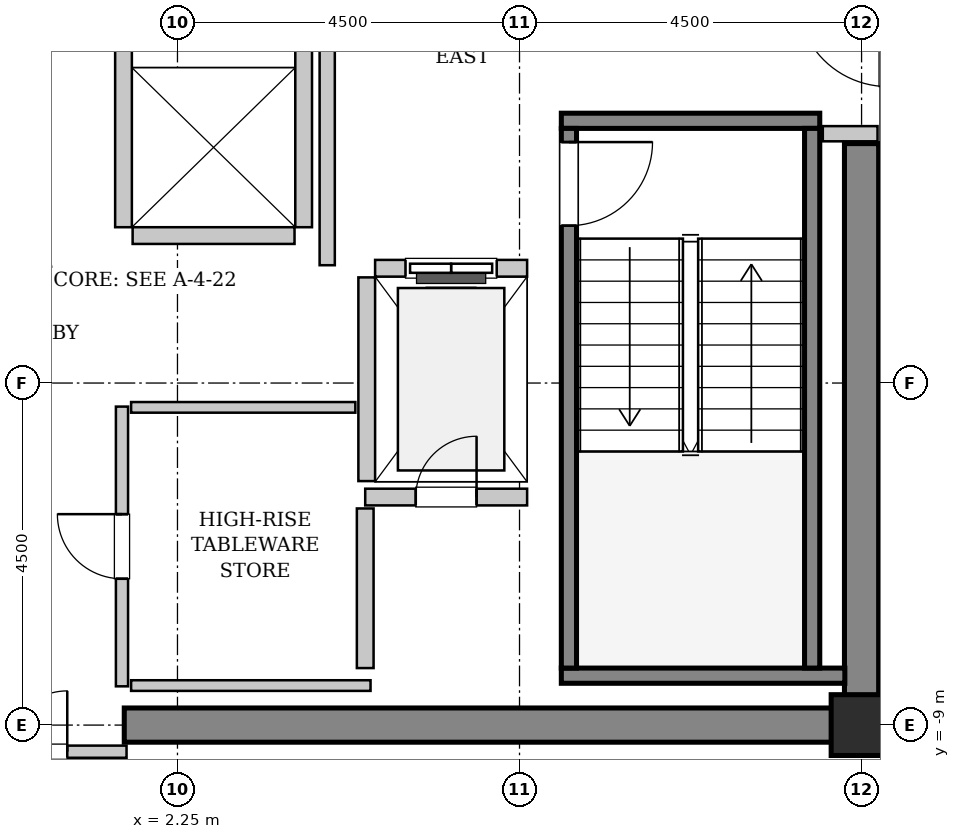
"""IFC4 building model, lengths in metres.
Left out: names, types, materials, properties, quantities, classifications, styles, units other than length and angle.
Written with IfcOpenShell. Run it as: python <this file> out.ifc"""

import sys

from ifc_helpers import new_model, si_unit, direction, frame, frame_2d, origin, origin_2d, place, context, subcontext, project, spatial, rectangle, hollow_rectangle, extrude, source, transform, mapped, element, fill, save


model = new_model("IFC4")
c1 = context("Model", 3, precision=1e-05, world=origin(), true_north=direction((0.0, 1.0)))
c2 = subcontext(c1, "Body", "Model", "MODEL_VIEW")
j1 = project(units=[si_unit("LENGTHUNIT", "METRE"), si_unit("PLANEANGLEUNIT", "RADIAN")], contexts=[c1])
p1 = place(None, origin())
s1 = spatial("IfcSite", under=j1, at=p1, CompositionType="ELEMENT")
p2 = place(p1, origin())
s2 = spatial("IfcBuilding", under=s1, at=p2, CompositionType="ELEMENT")
p3 = place(p2, frame((0.0, 0.0, 279.8)))
s3 = spatial("IfcBuildingStorey", under=s2, at=p3, CompositionType="ELEMENT", Elevation=279.8)
m1 = source(origin(), c2, "Body", "SweptSolid", [
    extrude(rectangle(XDim=9.925, YDim=0.45, at=frame_2d((4.962, 0.0))), origin(), (0.0, 0.0, 1.0), 3.8),
])
p4 = place(p3, frame((1.55, -9.0, 0.0), z_axis=(0.0, 0.0, 1.0), x_axis=(1.0, 0.0, 0.0)))
e1 = element("IfcWall", 1, at=p4, inside=s3, PredefinedType="SHEAR", context=c2, shape_type="MappedRepresentation", body=[
    mapped(m1, transform((0.0, 0.0, 0.0), x_axis=(1.0, 0.0, 0.0), y_axis=(0.0, 1.0, 0.0), z_axis=(0.0, 0.0, 1.0), scale=1.0)),
])
m2 = source(origin(), c2, "Body", "SweptSolid", [
    extrude(rectangle(XDim=7.425, YDim=0.45, at=frame_2d((3.712, 0.0))), origin(), (0.0, 0.0, 1.0), 3.8),
])
p5 = place(p3, frame((11.25, -8.775, 0.0), z_axis=(0.0, 0.0, 1.0), x_axis=(0.0, 1.0, 0.0)))
e2 = element("IfcWall", 2, at=p5, inside=s3, PredefinedType="SHEAR", context=c2, shape_type="MappedRepresentation", body=[
    mapped(m2, transform((0.0, 0.0, 0.0), x_axis=(1.0, 0.0, 0.0), y_axis=(0.0, 1.0, 0.0), z_axis=(0.0, 0.0, 1.0), scale=1.0)),
])
m3 = source(origin(), c2, "Body", "SweptSolid", [
    extrude(hollow_rectangle(XDim=0.8, YDim=0.8, WallThickness=0.04, InnerFilletRadius=0.04, OuterFilletRadius=0.08, at=origin_2d()), origin(), (0.0, 0.0, 1.0), 3.8),
])
p6 = place(p3, frame((11.25, -9.0, 0.0), z_axis=(0.0, 0.0, 1.0), x_axis=(1.0, 0.0, 0.0)))
e3 = element("IfcColumn", 3, at=p6, inside=s3, PredefinedType="COLUMN", context=c2, shape_type="MappedRepresentation", body=[
    mapped(m3, transform((0.0, 0.0, 0.0), x_axis=(1.0, 0.0, 0.0), y_axis=(0.0, 1.0, 0.0), z_axis=(0.0, 0.0, 1.0), scale=1.0)),
])
m4 = source(origin(), c2, "Body", "SweptSolid", [
    extrude(rectangle(XDim=3.4, YDim=0.2, at=frame_2d((1.7, 0.0))), origin(), (0.0, 0.0, 1.0), 3.8),
])
p7 = place(p3, frame((7.3, -1.05, 0.0), z_axis=(0.0, 0.0, 1.0), x_axis=(1.0, 0.0, 0.0)))
e4 = element("IfcWall", 4, at=p7, inside=s3, PredefinedType="SOLIDWALL", context=c2, shape_type="MappedRepresentation", body=[
    mapped(m4, transform((0.0, 0.0, 0.0), x_axis=(1.0, 0.0, 0.0), y_axis=(0.0, 1.0, 0.0), z_axis=(0.0, 0.0, 1.0), scale=1.0)),
])
m5 = source(origin(), c2, "Body", "SweptSolid", [
    extrude(rectangle(XDim=3.73, YDim=0.2, at=frame_2d((1.865, 0.0))), origin(), (0.0, 0.0, 1.0), 3.8),
])
p8 = place(p3, frame((7.3, -8.35, 0.0), z_axis=(0.0, 0.0, 1.0), x_axis=(1.0, 0.0, 0.0)))
e5 = element("IfcWall", 5, at=p8, inside=s3, PredefinedType="SOLIDWALL", context=c2, shape_type="MappedRepresentation", body=[
    mapped(m5, transform((0.0, 0.0, 0.0), x_axis=(1.0, 0.0, 0.0), y_axis=(0.0, 1.0, 0.0), z_axis=(0.0, 0.0, 1.0), scale=1.0)),
])
m6 = source(origin(), c2, "Body", "SweptSolid", [
    extrude(rectangle(XDim=7.1, YDim=0.2, at=frame_2d((3.55, 0.0))), origin(), (0.0, 0.0, 1.0), 3.8),
])
p9 = place(p3, frame((7.4, -1.15, 0.0), z_axis=(0.0, 0.0, 1.0), x_axis=(0.0, -1.0, 0.0)))
e6 = element("IfcWall", 6, at=p9, inside=s3, PredefinedType="SOLIDWALL", context=c2, shape_type="MappedRepresentation", body=[
    mapped(m6, transform((0.0, 0.0, 0.0), x_axis=(1.0, 0.0, 0.0), y_axis=(0.0, 1.0, 0.0), z_axis=(0.0, 0.0, 1.0), scale=1.0)),
])
p10 = place(p9, frame((0.18, 0.0, 0.0)))
e7 = element("IfcOpeningElement", 7, at=p10, cuts=e6, PredefinedType="OPENING", context=c2, shape_type="SweptSolid", body=[
    extrude(rectangle(XDim=1.1, YDim=2.15, at=frame_2d((0.55, 1.075))), frame((0.0, 0.11, 0.0), z_axis=(0.0, -1.0, 0.0), x_axis=(1.0, 0.0, 0.0)), (0.0, 0.0, 1.0), 0.22),
])
p11 = place(p3, frame((10.6, -1.15, 0.0), z_axis=(0.0, 0.0, 1.0), x_axis=(0.0, -1.0, 0.0)))
e8 = element("IfcWall", 8, at=p11, inside=s3, PredefinedType="SOLIDWALL", context=c2, shape_type="MappedRepresentation", body=[
    mapped(m6, transform((0.0, 0.0, 0.0), x_axis=(1.0, 0.0, 0.0), y_axis=(0.0, 1.0, 0.0), z_axis=(0.0, 0.0, 1.0), scale=1.0)),
])
m7 = source(origin(), c2, "Body", "SweptSolid", [
    extrude(rectangle(XDim=2.0, YDim=0.22, at=frame_2d((1.0, 0.0))), origin(), (0.0, 0.0, 1.0), 3.535),
])
p12 = place(p3, frame((6.85, -2.99, 0.0), z_axis=(0.0, 0.0, 1.0), x_axis=(-1.0, 0.0, 0.0)))
e9 = element("IfcWall", 9, at=p12, inside=s3, PredefinedType="SOLIDWALL", context=c2, shape_type="MappedRepresentation", body=[
    mapped(m7, transform((0.0, 0.0, 0.0), x_axis=(1.0, 0.0, 0.0), y_axis=(0.0, 1.0, 0.0), z_axis=(0.0, 0.0, 1.0), scale=1.0)),
])
p13 = place(p12, frame((0.4, 0.0, 0.0)))
e10 = element("IfcOpeningElement", 10, at=p13, cuts=e9, PredefinedType="OPENING", context=c2, shape_type="SweptSolid", body=[
    extrude(rectangle(XDim=1.2, YDim=2.2, at=frame_2d((0.6, 1.1))), frame((0.0, 0.12, 0.0), z_axis=(0.0, -1.0, 0.0), x_axis=(1.0, 0.0, 0.0)), (0.0, 0.0, 1.0), 0.24),
])
m8 = source(origin(), c2, "Body", "SweptSolid", [
    extrude(rectangle(XDim=2.68, YDim=0.22, at=frame_2d((1.34, 0.0))), origin(), (0.0, 0.0, 1.0), 3.535),
])
p14 = place(p3, frame((4.74, -3.11, 0.0), z_axis=(0.0, 0.0, 1.0), x_axis=(0.0, -1.0, 0.0)))
e11 = element("IfcWall", 11, at=p14, inside=s3, PredefinedType="SOLIDWALL", context=c2, shape_type="MappedRepresentation", body=[
    mapped(m8, transform((0.0, 0.0, 0.0), x_axis=(1.0, 0.0, 0.0), y_axis=(0.0, 1.0, 0.0), z_axis=(0.0, 0.0, 1.0), scale=1.0)),
])
m9 = source(origin(), c2, "Body", "SweptSolid", [
    extrude(rectangle(XDim=4.9, YDim=0.22, at=frame_2d((2.45, 0.0))), origin(), (0.0, 0.0, 1.0), 3.535),
])
for number, where, z_axis, x_axis in (
    (12, (1.54, 2.45, 0.0), (0.0, 0.0, 1.0), (0.0, -1.0, 0.0)),
    (13, (3.91, -2.45, 0.0), (0.0, 0.0, 1.0), (0.0, 1.0, 0.0)),
):
    element("IfcWall", number, at=place(p3, frame(where, z_axis=z_axis, x_axis=x_axis)), inside=s3, PredefinedType="SOLIDWALL", context=c2, shape_type="MappedRepresentation", body=[
        mapped(m9, transform((0.0, 0.0, 0.0), x_axis=(1.0, 0.0, 0.0), y_axis=(0.0, 1.0, 0.0), z_axis=(0.0, 0.0, 1.0), scale=1.0)),
    ])
m10 = source(origin(), c2, "Body", "SweptSolid", [
    extrude(rectangle(XDim=2.13, YDim=0.22, at=frame_2d((1.065, 0.0))), origin(), (0.0, 0.0, 1.0), 3.535),
])
p15 = place(p3, frame((1.66, -2.56, 0.0), z_axis=(0.0, 0.0, 1.0), x_axis=(1.0, 0.0, 0.0)))
e14 = element("IfcWall", 14, at=p15, inside=s3, PredefinedType="SOLIDWALL", context=c2, shape_type="MappedRepresentation", body=[
    mapped(m10, transform((0.0, 0.0, 0.0), x_axis=(1.0, 0.0, 0.0), y_axis=(0.0, 1.0, 0.0), z_axis=(0.0, 0.0, 1.0), scale=1.0)),
])
p16 = place(p3, frame((4.72, -6.0, 0.0), z_axis=(0.0, 0.0, 1.0), x_axis=(1.0, 0.0, 0.0)))
e15 = element("IfcWall", 15, at=p16, inside=s3, PredefinedType="SOLIDWALL", context=c2, shape_type="MappedRepresentation", body=[
    mapped(m10, transform((0.0, 0.0, 0.0), x_axis=(1.0, 0.0, 0.0), y_axis=(0.0, 1.0, 0.0), z_axis=(0.0, 0.0, 1.0), scale=1.0)),
])
p17 = place(p16, frame((0.665, 0.0, 0.0)))
e16 = element("IfcOpeningElement", 16, at=p17, cuts=e15, PredefinedType="OPENING", context=c2, shape_type="SweptSolid", body=[
    extrude(rectangle(XDim=0.8, YDim=2.0, at=frame_2d((0.4, 1.0))), frame((0.0, 0.12, 0.0), z_axis=(0.0, -1.0, 0.0), x_axis=(1.0, 0.0, 0.0)), (0.0, 0.0, 1.0), 0.24),
])
m11 = source(origin(), c2, "Body", "SweptSolid", [
    extrude(rectangle(XDim=2.1, YDim=0.22, at=frame_2d((1.05, 0.0))), origin(), (0.0, 0.0, 1.0), 3.535),
])
p18 = place(p3, frame((4.72, -8.25, 0.0), z_axis=(0.0, 0.0, 1.0), x_axis=(0.0, 1.0, 0.0)))
e17 = element("IfcWall", 17, at=p18, inside=s3, PredefinedType="SOLIDWALL", context=c2, shape_type="MappedRepresentation", body=[
    mapped(m11, transform((0.0, 0.0, 0.0), x_axis=(1.0, 0.0, 0.0), y_axis=(0.0, 1.0, 0.0), z_axis=(0.0, 0.0, 1.0), scale=1.0)),
])
m12 = source(origin(), c2, "Body", "SweptSolid", [
    extrude(rectangle(XDim=5.9, YDim=0.2, at=frame_2d((2.95, 0.0))), origin(), (0.0, 0.0, 1.0), 3.535),
])
p19 = place(p3, frame((4.22, -2.95, 0.0), z_axis=(0.0, 0.0, 1.0), x_axis=(0.0, 1.0, 0.0)))
e18 = element("IfcWall", 18, at=p19, inside=s3, PredefinedType="PARTITIONING", context=c2, shape_type="MappedRepresentation", body=[
    mapped(m12, transform((0.0, 0.0, 0.0), x_axis=(1.0, 0.0, 0.0), y_axis=(0.0, 1.0, 0.0), z_axis=(0.0, 0.0, 1.0), scale=1.0)),
])
m13 = source(origin(), c2, "Body", "SweptSolid", [
    extrude(rectangle(XDim=0.72, YDim=0.2, at=frame_2d((0.36, 0.0))), origin(), (0.0, 0.0, 1.0), 3.535),
])
p20 = place(p3, frame((10.74, -1.22, 0.0), z_axis=(0.0, 0.0, 1.0), x_axis=(1.0, 0.0, 0.0)))
e19 = element("IfcWall", 19, at=p20, inside=s3, PredefinedType="PARTITIONING", context=c2, shape_type="MappedRepresentation", body=[
    mapped(m13, transform((0.0, 0.0, 0.0), x_axis=(1.0, 0.0, 0.0), y_axis=(0.0, 1.0, 0.0), z_axis=(0.0, 0.0, 1.0), scale=1.0)),
])
m14 = source(origin(), c2, "Body", "SweptSolid", [
    extrude(rectangle(XDim=3.16, YDim=0.16, at=frame_2d((1.58, 0.0))), origin(), (0.0, 0.0, 1.0), 2.625),
])
p21 = place(p3, frame((-1.58, -9.35, 0.0), z_axis=(0.0, 0.0, 1.0), x_axis=(1.0, 0.0, 0.0)))
e20 = element("IfcWall", 20, at=p21, inside=s3, PredefinedType="PARTITIONING", context=c2, shape_type="MappedRepresentation", body=[
    mapped(m14, transform((0.0, 0.0, 0.0), x_axis=(1.0, 0.0, 0.0), y_axis=(0.0, 1.0, 0.0), z_axis=(0.0, 0.0, 1.0), scale=1.0)),
])
p22 = place(p21, frame((0.78, 0.0, 0.0)))
e21 = element("IfcOpeningElement", 21, at=p22, cuts=e20, PredefinedType="OPENING", context=c2, shape_type="SweptSolid", body=[
    extrude(rectangle(XDim=1.6, YDim=2.3, at=frame_2d((0.8, 1.15))), frame((0.0, 0.09, 0.0), z_axis=(0.0, -1.0, 0.0), x_axis=(1.0, 0.0, 0.0)), (0.0, 0.0, 1.0), 0.18),
])
m15 = source(origin(), c2, "Body", "SweptSolid", [
    extrude(rectangle(XDim=3.68, YDim=0.16, at=frame_2d((1.84, 0.0))), origin(), (0.0, 0.0, 1.0), 3.535),
])
p23 = place(p3, frame((1.52, -8.49, 0.0), z_axis=(0.0, 0.0, 1.0), x_axis=(0.0, 1.0, 0.0)))
e22 = element("IfcWall", 22, at=p23, inside=s3, PredefinedType="PARTITIONING", context=c2, shape_type="MappedRepresentation", body=[
    mapped(m15, transform((0.0, 0.0, 0.0), x_axis=(1.0, 0.0, 0.0), y_axis=(0.0, 1.0, 0.0), z_axis=(0.0, 0.0, 1.0), scale=1.0)),
])
p24 = place(p23, frame((1.415, 0.0, 0.0)))
e23 = element("IfcOpeningElement", 23, at=p24, cuts=e22, PredefinedType="OPENING", context=c2, shape_type="SweptSolid", body=[
    extrude(rectangle(XDim=0.85, YDim=2.1, at=frame_2d((0.425, 1.05))), frame((0.0, 0.09, 0.0), z_axis=(0.0, -1.0, 0.0), x_axis=(1.0, 0.0, 0.0)), (0.0, 0.0, 1.0), 0.18),
])
m16 = source(origin(), c2, "Body", "SweptSolid", [
    extrude(rectangle(XDim=2.95, YDim=0.14, at=frame_2d((1.475, 0.0))), origin(), (0.0, 0.0, 1.0), 3.535),
])
p25 = place(p3, frame((1.64, -4.82, 0.0), z_axis=(0.0, 0.0, 1.0), x_axis=(1.0, 0.0, 0.0)))
e24 = element("IfcWall", 24, at=p25, inside=s3, PredefinedType="PARTITIONING", context=c2, shape_type="MappedRepresentation", body=[
    mapped(m16, transform((0.0, 0.0, 0.0), x_axis=(1.0, 0.0, 0.0), y_axis=(0.0, 1.0, 0.0), z_axis=(0.0, 0.0, 1.0), scale=1.0)),
])
m17 = source(origin(), c2, "Body", "SweptSolid", [
    extrude(rectangle(XDim=3.15, YDim=0.14, at=frame_2d((1.575, 0.0))), origin(), (0.0, 0.0, 1.0), 3.535),
])
p26 = place(p3, frame((1.64, -8.48, 0.0), z_axis=(0.0, 0.0, 1.0), x_axis=(1.0, 0.0, 0.0)))
e25 = element("IfcWall", 25, at=p26, inside=s3, PredefinedType="PARTITIONING", context=c2, shape_type="MappedRepresentation", body=[
    mapped(m17, transform((0.0, 0.0, 0.0), x_axis=(1.0, 0.0, 0.0), y_axis=(0.0, 1.0, 0.0), z_axis=(0.0, 0.0, 1.0), scale=1.0)),
])
m18 = source(origin(), c2, "Body", "SweptSolid", [
    extrude(rectangle(XDim=1.1, YDim=2.15, at=frame_2d((0.55, 1.075))), frame((0.0, 0.025, 0.0), z_axis=(0.0, -1.0, 0.0), x_axis=(1.0, 0.0, 0.0)), (0.0, 0.0, 1.0), 0.05),
])
p27 = place(p10, origin())
e26 = element("IfcDoor", 26, at=p27, inside=s3, OperationType="SINGLE_SWING_LEFT", PredefinedType="DOOR", context=c2, shape_type="MappedRepresentation", body=[
    mapped(m18, transform((0.0, 0.0, 0.0), x_axis=(1.0, 0.0, 0.0), y_axis=(0.0, 1.0, 0.0), z_axis=(0.0, 0.0, 1.0), scale=1.0)),
])
fill(e7, e26)
m19 = source(origin(), c2, "Body", "SweptSolid", [
    extrude(rectangle(XDim=1.2, YDim=2.2, at=frame_2d((0.6, 1.1))), frame((0.0, 0.025, 0.0), z_axis=(0.0, -1.0, 0.0), x_axis=(1.0, 0.0, 0.0)), (0.0, 0.0, 1.0), 0.05),
])
p28 = place(p13, origin())
e27 = element("IfcDoor", 27, at=p28, inside=s3, OperationType="SLIDING_TO_LEFT", PredefinedType="DOOR", context=c2, shape_type="MappedRepresentation", body=[
    mapped(m19, transform((0.0, 0.0, 0.0), x_axis=(1.0, 0.0, 0.0), y_axis=(0.0, 1.0, 0.0), z_axis=(0.0, 0.0, 1.0), scale=1.0)),
])
fill(e10, e27)
m20 = source(origin(), c2, "Body", "SweptSolid", [
    extrude(rectangle(XDim=0.8, YDim=2.0, at=frame_2d((0.4, 1.0))), frame((0.0, 0.025, 0.0), z_axis=(0.0, -1.0, 0.0), x_axis=(1.0, 0.0, 0.0)), (0.0, 0.0, 1.0), 0.05),
])
p29 = place(p17, origin())
e28 = element("IfcDoor", 28, at=p29, inside=s3, OperationType="SINGLE_SWING_RIGHT", PredefinedType="TRAPDOOR", context=c2, shape_type="MappedRepresentation", body=[
    mapped(m20, transform((0.0, 0.0, 0.0), x_axis=(1.0, 0.0, 0.0), y_axis=(0.0, 1.0, 0.0), z_axis=(0.0, 0.0, 1.0), scale=1.0)),
])
fill(e16, e28)
m21 = source(origin(), c2, "Body", "SweptSolid", [
    extrude(rectangle(XDim=1.6, YDim=2.3, at=frame_2d((0.8, 1.15))), frame((0.0, 0.025, 0.0), z_axis=(0.0, -1.0, 0.0), x_axis=(1.0, 0.0, 0.0)), (0.0, 0.0, 1.0), 0.05),
])
p30 = place(p22, origin())
e29 = element("IfcDoor", 29, at=p30, inside=s3, OperationType="DOUBLE_DOOR_SINGLE_SWING", PredefinedType="DOOR", context=c2, shape_type="MappedRepresentation", body=[
    mapped(m21, transform((0.0, 0.0, 0.0), x_axis=(1.0, 0.0, 0.0), y_axis=(0.0, 1.0, 0.0), z_axis=(0.0, 0.0, 1.0), scale=1.0)),
])
fill(e21, e29)
m22 = source(origin(), c2, "Body", "SweptSolid", [
    extrude(rectangle(XDim=0.85, YDim=2.1, at=frame_2d((0.425, 1.05))), frame((0.0, 0.025, 0.0), z_axis=(0.0, -1.0, 0.0), x_axis=(1.0, 0.0, 0.0)), (0.0, 0.0, 1.0), 0.05),
])
p31 = place(p24, origin())
e30 = element("IfcDoor", 30, at=p31, inside=s3, OperationType="SINGLE_SWING_RIGHT", PredefinedType="DOOR", context=c2, shape_type="MappedRepresentation", body=[
    mapped(m22, transform((0.0, 0.0, 0.0), x_axis=(1.0, 0.0, 0.0), y_axis=(0.0, 1.0, 0.0), z_axis=(0.0, 0.0, 1.0), scale=1.0)),
])
fill(e23, e30)
save(model, sys.argv[1])
